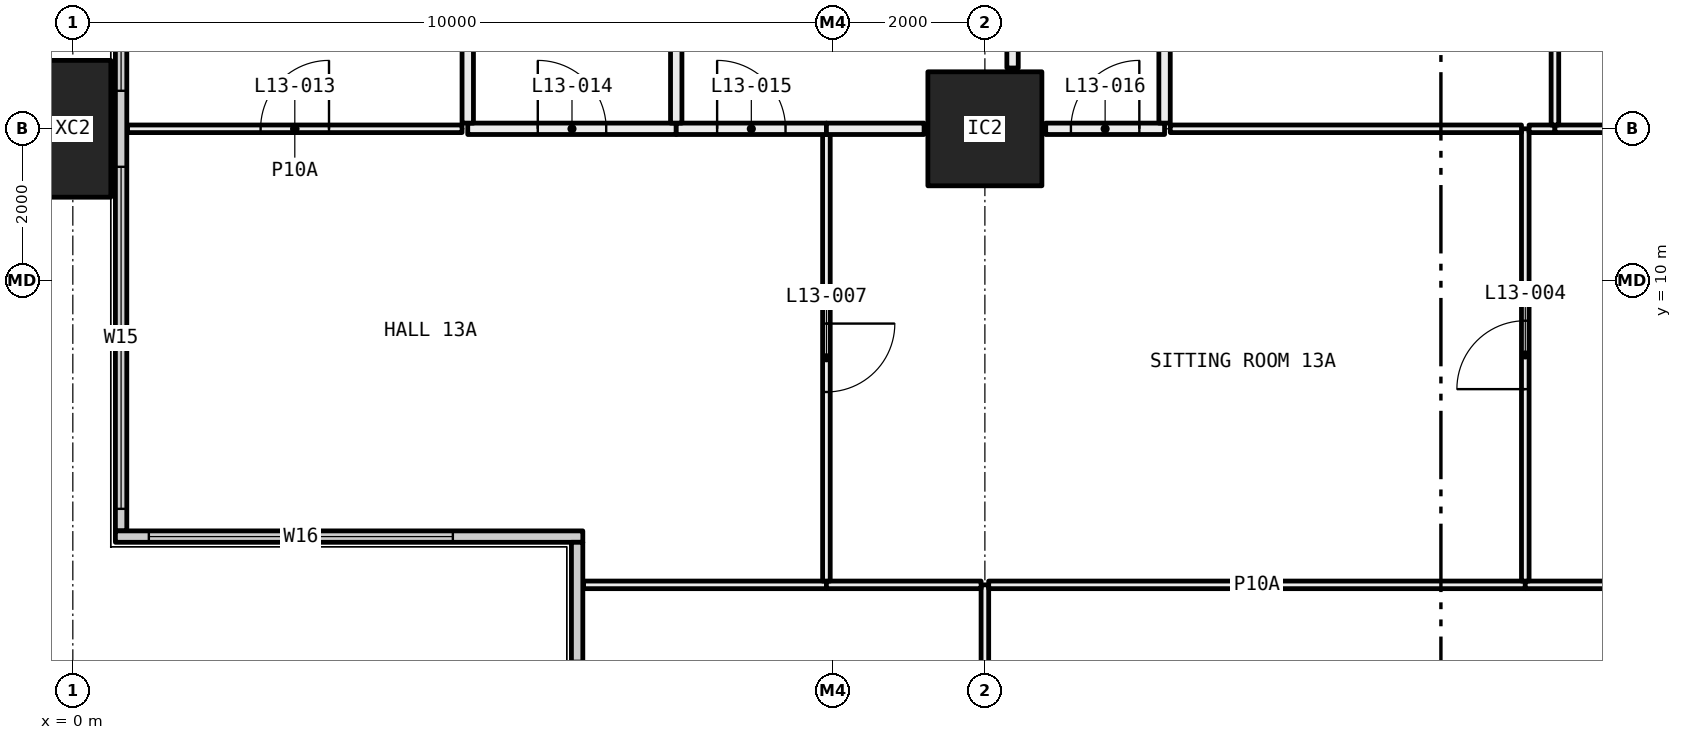
"""IFC4 building model, lengths in metres.
Left out: names, types, materials, properties, quantities, classifications, styles, units other than length and angle.
Written with IfcOpenShell. Run it as: python <this file> out.ifc"""

import sys

from ifc_helpers import new_model, si_unit, direction, frame, frame_2d, origin, origin_2d, place, context, subcontext, project, spatial, rectangle, hollow_rectangle, extrude, element, fill, save


model = new_model("IFC4")
c1 = context("Model", 3, precision=1e-05, world=origin(), true_north=direction((0.0, 1.0)))
c2 = subcontext(c1, "Body", "Model", "MODEL_VIEW")
j1 = project(units=[si_unit("LENGTHUNIT", "METRE"), si_unit("PLANEANGLEUNIT", "RADIAN")], contexts=[c1])
p1 = place(None, origin())
s1 = spatial("IfcSite", under=j1, at=p1, CompositionType="ELEMENT")
p2 = place(p1, origin())
s2 = spatial("IfcBuilding", under=s1, at=p2, CompositionType="ELEMENT")
p3 = place(p2, frame((0.0, 0.0, 57.6)))
s3 = spatial("IfcBuildingStorey", under=s2, at=p3, CompositionType="ELEMENT", Elevation=57.6)
p4 = place(p3, frame((0.0, 12.0, -0.4), z_axis=(0.0, 0.0, 1.0), x_axis=(0.0, 1.0, 0.0)))
e1 = element("IfcColumn", 1, at=p4, inside=s3, PredefinedType="COLUMN", context=c2, shape_type="SweptSolid", body=[
    extrude(hollow_rectangle(XDim=1.8, YDim=1.0, WallThickness=0.07, at=origin_2d()), origin(), (0.0, 0.0, 1.0), 3.45),
])
p5 = place(p3, frame((12.0, 12.0, 0.0), z_axis=(0.0, 0.0, 1.0), x_axis=(1.0, 0.0, 0.0)))
e2 = element("IfcColumn", 2, at=p5, inside=s3, PredefinedType="COLUMN", context=c2, shape_type="SweptSolid", body=[
    extrude(hollow_rectangle(XDim=1.5, YDim=1.5, WallThickness=0.065, at=origin_2d()), origin(), (0.0, 0.0, 1.0), 3.05),
])
p6 = place(p3, frame((0.635, 6.71, 0.0), z_axis=(0.0, 0.0, 1.0), x_axis=(0.0, 1.0, 0.0)))
e3 = element("IfcWall", 3, at=p6, inside=s3, PredefinedType="ELEMENTEDWALL", context=c2, shape_type="SweptSolid", body=[
    extrude(rectangle(XDim=34.58, YDim=0.15, at=frame_2d((17.29, 0.0))), origin(), (0.0, 0.0, 1.0), 3.05),
])
p7 = place(p6, frame((0.29, 0.0, 0.45)))
e4 = element("IfcOpeningElement", 4, at=p7, cuts=e3, PredefinedType="OPENING", context=c2, shape_type="SweptSolid", body=[
    extrude(rectangle(XDim=4.5, YDim=2.55, at=frame_2d((2.25, 1.275))), frame((0.0, 0.085, 0.0), z_axis=(0.0, -1.0, 0.0), x_axis=(1.0, 0.0, 0.0)), (0.0, 0.0, 1.0), 0.17),
])
p8 = place(p6, frame((5.79, 0.0, 0.45)))
e5 = element("IfcOpeningElement", 5, at=p8, cuts=e3, PredefinedType="OPENING", context=c2, shape_type="SweptSolid", body=[
    extrude(rectangle(XDim=3.25, YDim=2.55, at=frame_2d((1.625, 1.275))), frame((0.0, 0.085, 0.0), z_axis=(0.0, -1.0, 0.0), x_axis=(1.0, 0.0, 0.0)), (0.0, 0.0, 1.0), 0.17),
])
p9 = place(p6, frame((13.54, 0.0, 0.45)))
e6 = element("IfcOpeningElement", 6, at=p9, cuts=e3, PredefinedType="OPENING", context=c2, shape_type="SweptSolid", body=[
    extrude(rectangle(XDim=3.25, YDim=2.55, at=frame_2d((1.625, 1.275))), frame((0.0, 0.085, 0.0), z_axis=(0.0, -1.0, 0.0), x_axis=(1.0, 0.0, 0.0)), (0.0, 0.0, 1.0), 0.17),
])
p10 = place(p6, frame((17.79, 0.0, 0.45)))
e7 = element("IfcOpeningElement", 7, at=p10, cuts=e3, PredefinedType="OPENING", context=c2, shape_type="SweptSolid", body=[
    extrude(rectangle(XDim=3.25, YDim=2.55, at=frame_2d((1.625, 1.275))), frame((0.0, 0.085, 0.0), z_axis=(0.0, -1.0, 0.0), x_axis=(1.0, 0.0, 0.0)), (0.0, 0.0, 1.0), 0.17),
])
p11 = place(p6, frame((26.79, 0.0, 0.45)))
e8 = element("IfcOpeningElement", 8, at=p11, cuts=e3, PredefinedType="OPENING", context=c2, shape_type="SweptSolid", body=[
    extrude(rectangle(XDim=2.0, YDim=2.55, at=frame_2d((1.0, 1.275))), frame((0.0, 0.085, 0.0), z_axis=(0.0, -1.0, 0.0), x_axis=(1.0, 0.0, 0.0)), (0.0, 0.0, 1.0), 0.17),
])
p12 = place(p6, frame((29.79, 0.0, 0.45)))
e9 = element("IfcOpeningElement", 9, at=p12, cuts=e3, PredefinedType="OPENING", context=c2, shape_type="SweptSolid", body=[
    extrude(rectangle(XDim=4.5, YDim=2.55, at=frame_2d((2.25, 1.275))), frame((0.0, 0.085, 0.0), z_axis=(0.0, -1.0, 0.0), x_axis=(1.0, 0.0, 0.0)), (0.0, 0.0, 1.0), 0.17),
])
p13 = place(p3, frame((0.56, 6.635, 0.0), z_axis=(0.0, 0.0, 1.0), x_axis=(1.0, 0.0, 0.0)))
e10 = element("IfcWall", 10, at=p13, inside=s3, PredefinedType="ELEMENTEDWALL", context=c2, shape_type="SweptSolid", body=[
    extrude(rectangle(XDim=6.15, YDim=0.15, at=frame_2d((3.075, 0.0))), origin(), (0.0, 0.0, 1.0), 3.05),
])
p14 = place(p13, frame((0.44, 0.0, 0.45)))
e11 = element("IfcOpeningElement", 11, at=p14, cuts=e10, PredefinedType="OPENING", context=c2, shape_type="SweptSolid", body=[
    extrude(rectangle(XDim=4.0, YDim=2.55, at=frame_2d((2.0, 1.275))), frame((0.0, 0.085, 0.0), z_axis=(0.0, -1.0, 0.0), x_axis=(1.0, 0.0, 0.0)), (0.0, 0.0, 1.0), 0.17),
])
p15 = place(p3, frame((6.635, 0.71, 0.0), z_axis=(0.0, 0.0, 1.0), x_axis=(0.0, 1.0, 0.0)))
e12 = element("IfcWall", 12, at=p15, inside=s3, PredefinedType="ELEMENTEDWALL", context=c2, shape_type="SweptSolid", body=[
    extrude(rectangle(XDim=5.85, YDim=0.15, at=frame_2d((2.925, 0.0))), origin(), (0.0, 0.0, 1.0), 3.05),
])
p16 = place(p15, frame((0.29, 0.0, 0.45)))
e13 = element("IfcOpeningElement", 13, at=p16, cuts=e12, PredefinedType="OPENING", context=c2, shape_type="SweptSolid", body=[
    extrude(rectangle(XDim=4.0, YDim=2.55, at=frame_2d((2.0, 1.275))), frame((0.0, 0.085, 0.0), z_axis=(0.0, -1.0, 0.0), x_axis=(1.0, 0.0, 0.0)), (0.0, 0.0, 1.0), 0.17),
])
p17 = place(p3, frame((12.0, 0.72, 0.0), z_axis=(0.0, 0.0, 1.0), x_axis=(0.0, 1.0, 0.0)))
e14 = element("IfcWall", 14, at=p17, inside=s3, PredefinedType="PARTITIONING", context=c2, shape_type="SweptSolid", body=[
    extrude(rectangle(XDim=5.28, YDim=0.1, at=frame_2d((2.64, 0.0))), origin(), (0.0, 0.0, 1.0), 2.45),
])
p18 = place(p17, frame((2.19, 0.0, 0.0)))
e15 = element("IfcOpeningElement", 15, at=p18, cuts=e14, PredefinedType="OPENING", context=c2, shape_type="SweptSolid", body=[
    extrude(rectangle(XDim=0.9, YDim=2.1, at=frame_2d((0.45, 1.05))), frame((0.0, 0.06, 0.0), z_axis=(0.0, -1.0, 0.0), x_axis=(1.0, 0.0, 0.0)), (0.0, 0.0, 1.0), 0.12),
])
p19 = place(p3, frame((9.915, 6.0, 0.0), z_axis=(0.0, 0.0, 1.0), x_axis=(-1.0, 0.0, 0.0)))
e16 = element("IfcWall", 16, at=p19, inside=s3, PredefinedType="PARTITIONING", context=c2, shape_type="SweptSolid", body=[
    extrude(rectangle(XDim=3.195, YDim=0.1, at=frame_2d((1.598, 0.0))), origin(), (0.0, 0.0, 1.0), 3.05),
])
p20 = place(p3, frame((11.95, 6.0, 0.0), z_axis=(0.0, 0.0, 1.0), x_axis=(-1.0, 0.0, 0.0)))
e17 = element("IfcWall", 17, at=p20, inside=s3, PredefinedType="PARTITIONING", context=c2, shape_type="SweptSolid", body=[
    extrude(rectangle(XDim=2.035, YDim=0.1, at=frame_2d((1.018, 0.0))), origin(), (0.0, 0.0, 1.0), 2.45),
])
p21 = place(p3, frame((19.11, 6.0, 0.0), z_axis=(0.0, 0.0, 1.0), x_axis=(-1.0, 0.0, 0.0)))
e18 = element("IfcWall", 18, at=p21, inside=s3, PredefinedType="PARTITIONING", context=c2, shape_type="SweptSolid", body=[
    extrude(rectangle(XDim=7.06, YDim=0.1, at=frame_2d((3.53, 0.0))), origin(), (0.0, 0.0, 1.0), 2.45),
])
p22 = place(p3, frame((23.95, 6.0, 0.0), z_axis=(0.0, 0.0, 1.0), x_axis=(-1.0, 0.0, 0.0)))
e19 = element("IfcWall", 19, at=p22, inside=s3, PredefinedType="PARTITIONING", context=c2, shape_type="SweptSolid", body=[
    extrude(rectangle(XDim=4.84, YDim=0.1, at=frame_2d((2.42, 0.0))), origin(), (0.0, 0.0, 1.0), 2.45),
])
p23 = place(p22, frame((1.97, 0.0, 0.0)))
e20 = element("IfcOpeningElement", 20, at=p23, cuts=e19, PredefinedType="OPENING", context=c2, shape_type="SweptSolid", body=[
    extrude(rectangle(XDim=0.9, YDim=2.1, at=frame_2d((0.45, 1.05))), frame((0.0, 0.06, 0.0), z_axis=(0.0, -1.0, 0.0), x_axis=(1.0, 0.0, 0.0)), (0.0, 0.0, 1.0), 0.12),
])
p24 = place(p3, frame((9.915, 6.05, 0.0), z_axis=(0.0, 0.0, 1.0), x_axis=(0.0, 1.0, 0.0)))
e21 = element("IfcWall", 21, at=p24, inside=s3, PredefinedType="PARTITIONING", context=c2, shape_type="SweptSolid", body=[
    extrude(rectangle(XDim=5.875, YDim=0.1, at=frame_2d((2.938, 0.0))), origin(), (0.0, 0.0, 1.0), 2.45),
])
p25 = place(p24, frame((2.488, 0.0, 0.0)))
e22 = element("IfcOpeningElement", 22, at=p25, cuts=e21, PredefinedType="OPENING", context=c2, shape_type="SweptSolid", body=[
    extrude(rectangle(XDim=0.9, YDim=2.1, at=frame_2d((0.45, 1.05))), frame((0.0, 0.06, 0.0), z_axis=(0.0, -1.0, 0.0), x_axis=(1.0, 0.0, 0.0)), (0.0, 0.0, 1.0), 0.12),
])
p26 = place(p3, frame((5.121, 12.0, 0.0), z_axis=(0.0, 0.0, 1.0), x_axis=(-1.0, 0.0, 0.0)))
e23 = element("IfcWall", 23, at=p26, inside=s3, PredefinedType="PARTITIONING", context=c2, shape_type="SweptSolid", body=[
    extrude(rectangle(XDim=4.401, YDim=0.1, at=frame_2d((2.201, 0.0))), origin(), (0.0, 0.0, 1.0), 2.45),
])
p27 = place(p26, frame((1.75, 0.0, 0.0)))
e24 = element("IfcOpeningElement", 24, at=p27, cuts=e23, PredefinedType="OPENING", context=c2, shape_type="SweptSolid", body=[
    extrude(rectangle(XDim=0.9, YDim=2.1, at=frame_2d((0.45, 1.05))), frame((0.0, 0.06, 0.0), z_axis=(0.0, -1.0, 0.0), x_axis=(1.0, 0.0, 0.0)), (0.0, 0.0, 1.0), 0.12),
])
p28 = place(p3, frame((7.939, 12.0, 0.0), z_axis=(0.0, 0.0, 1.0), x_axis=(-1.0, 0.0, 0.0)))
e25 = element("IfcWall", 25, at=p28, inside=s3, PredefinedType="PARTITIONING", context=c2, shape_type="SweptSolid", body=[
    extrude(rectangle(XDim=2.743, YDim=0.15, at=frame_2d((1.372, 0.0))), origin(), (0.0, 0.0, 1.0), 2.45),
])
p29 = place(p28, frame((0.921, 0.0, 0.0)))
e26 = element("IfcOpeningElement", 26, at=p29, cuts=e25, PredefinedType="OPENING", context=c2, shape_type="SweptSolid", body=[
    extrude(rectangle(XDim=0.9, YDim=2.1, at=frame_2d((0.45, 1.05))), frame((0.0, 0.085, 0.0), z_axis=(0.0, -1.0, 0.0), x_axis=(1.0, 0.0, 0.0)), (0.0, 0.0, 1.0), 0.17),
])
p30 = place(p3, frame((9.915, 12.0, 0.0), z_axis=(0.0, 0.0, 1.0), x_axis=(-1.0, 0.0, 0.0)))
e27 = element("IfcWall", 27, at=p30, inside=s3, PredefinedType="PARTITIONING", context=c2, shape_type="SweptSolid", body=[
    extrude(rectangle(XDim=1.976, YDim=0.15, at=frame_2d((0.988, 0.0))), origin(), (0.0, 0.0, 1.0), 2.45),
])
p31 = place(p30, frame((0.538, 0.0, 0.0)))
e28 = element("IfcOpeningElement", 28, at=p31, cuts=e27, PredefinedType="OPENING", context=c2, shape_type="SweptSolid", body=[
    extrude(rectangle(XDim=0.9, YDim=2.1, at=frame_2d((0.45, 1.05))), frame((0.0, 0.085, 0.0), z_axis=(0.0, -1.0, 0.0), x_axis=(1.0, 0.0, 0.0)), (0.0, 0.0, 1.0), 0.17),
])
p32 = place(p3, frame((19.11, 6.05, 0.0), z_axis=(0.0, 0.0, 1.0), x_axis=(0.0, 1.0, 0.0)))
e29 = element("IfcWall", 29, at=p32, inside=s3, PredefinedType="PARTITIONING", context=c2, shape_type="SweptSolid", body=[
    extrude(rectangle(XDim=5.95, YDim=0.1, at=frame_2d((2.975, 0.0))), origin(), (0.0, 0.0, 1.0), 2.45),
])
p33 = place(p32, frame((2.525, 0.0, 0.0)))
e30 = element("IfcOpeningElement", 30, at=p33, cuts=e29, PredefinedType="OPENING", context=c2, shape_type="SweptSolid", body=[
    extrude(rectangle(XDim=0.9, YDim=2.1, at=frame_2d((0.45, 1.05))), frame((0.0, 0.06, 0.0), z_axis=(0.0, -1.0, 0.0), x_axis=(1.0, 0.0, 0.0)), (0.0, 0.0, 1.0), 0.12),
])
p34 = place(p3, frame((11.2, 12.0, 0.0), z_axis=(0.0, 0.0, 1.0), x_axis=(-1.0, 0.0, 0.0)))
e31 = element("IfcWall", 31, at=p34, inside=s3, PredefinedType="PARTITIONING", context=c2, shape_type="SweptSolid", body=[
    extrude(rectangle(XDim=1.285, YDim=0.15, at=frame_2d((0.643, 0.0))), origin(), (0.0, 0.0, 1.0), 2.45),
])
p35 = place(p3, frame((14.364, 12.0, 0.0), z_axis=(0.0, 0.0, 1.0), x_axis=(-1.0, 0.0, 0.0)))
e32 = element("IfcWall", 32, at=p35, inside=s3, PredefinedType="PARTITIONING", context=c2, shape_type="SweptSolid", body=[
    extrude(rectangle(XDim=1.564, YDim=0.15, at=frame_2d((0.782, 0.0))), origin(), (0.0, 0.0, 1.0), 2.45),
])
p36 = place(p35, frame((0.332, 0.0, 0.0)))
e33 = element("IfcOpeningElement", 33, at=p36, cuts=e32, PredefinedType="OPENING", context=c2, shape_type="SweptSolid", body=[
    extrude(rectangle(XDim=0.9, YDim=2.1, at=frame_2d((0.45, 1.05))), frame((0.0, 0.085, 0.0), z_axis=(0.0, -1.0, 0.0), x_axis=(1.0, 0.0, 0.0)), (0.0, 0.0, 1.0), 0.17),
])
p37 = place(p3, frame((19.06, 12.0, 0.0), z_axis=(0.0, 0.0, 1.0), x_axis=(-1.0, 0.0, 0.0)))
e34 = element("IfcWall", 34, at=p37, inside=s3, PredefinedType="PARTITIONING", context=c2, shape_type="SweptSolid", body=[
    extrude(rectangle(XDim=4.621, YDim=0.1, at=frame_2d((2.311, 0.0))), origin(), (0.0, 0.0, 1.0), 2.45),
])
p38 = place(p3, frame((19.5, 12.0, 0.0), z_axis=(0.0, 0.0, 1.0), x_axis=(-1.0, 0.0, 0.0)))
e35 = element("IfcWall", 35, at=p38, inside=s3, PredefinedType="PARTITIONING", context=c2, shape_type="SweptSolid", body=[
    extrude(rectangle(XDim=0.34, YDim=0.1, at=frame_2d((0.17, 0.0))), origin(), (0.0, 0.0, 1.0), 2.45),
])
p39 = place(p3, frame((23.2, 12.0, 0.0), z_axis=(0.0, 0.0, 1.0), x_axis=(-1.0, 0.0, 0.0)))
e36 = element("IfcWall", 36, at=p39, inside=s3, PredefinedType="PARTITIONING", context=c2, shape_type="SweptSolid", body=[
    extrude(rectangle(XDim=3.7, YDim=0.1, at=frame_2d((1.85, 0.0))), origin(), (0.0, 0.0, 1.0), 2.45),
])
p40 = place(p39, frame((1.4, 0.0, 0.0)))
e37 = element("IfcOpeningElement", 37, at=p40, cuts=e36, PredefinedType="OPENING", context=c2, shape_type="SweptSolid", body=[
    extrude(rectangle(XDim=0.9, YDim=2.1, at=frame_2d((0.45, 1.05))), frame((0.0, 0.06, 0.0), z_axis=(0.0, -1.0, 0.0), x_axis=(1.0, 0.0, 0.0)), (0.0, 0.0, 1.0), 0.12),
])
p41 = place(p3, frame((5.196, 12.075, 0.0), z_axis=(0.0, 0.0, 1.0), x_axis=(0.0, 1.0, 0.0)))
e38 = element("IfcWall", 38, at=p41, inside=s3, PredefinedType="PARTITIONING", context=c2, shape_type="SweptSolid", body=[
    extrude(rectangle(XDim=5.825, YDim=0.15, at=frame_2d((2.913, 0.0))), origin(), (0.0, 0.0, 1.0), 2.45),
])
p42 = place(p3, frame((7.939, 12.075, 0.0), z_axis=(0.0, 0.0, 1.0), x_axis=(0.0, 1.0, 0.0)))
e39 = element("IfcWall", 39, at=p42, inside=s3, PredefinedType="PARTITIONING", context=c2, shape_type="SweptSolid", body=[
    extrude(rectangle(XDim=2.637, YDim=0.15, at=frame_2d((1.318, 0.0))), origin(), (0.0, 0.0, 1.0), 2.45),
])
p43 = place(p3, frame((12.364, 12.8, 0.0), z_axis=(0.0, 0.0, 1.0), x_axis=(0.0, 1.0, 0.0)))
e40 = element("IfcWall", 40, at=p43, inside=s3, PredefinedType="PARTITIONING", context=c2, shape_type="SweptSolid", body=[
    extrude(rectangle(XDim=1.837, YDim=0.15, at=frame_2d((0.918, 0.0))), origin(), (0.0, 0.0, 1.0), 3.05),
])
p44 = place(p3, frame((14.364, 12.075, 0.0), z_axis=(0.0, 0.0, 1.0), x_axis=(0.0, 1.0, 0.0)))
e41 = element("IfcWall", 41, at=p44, inside=s3, PredefinedType="PARTITIONING", context=c2, shape_type="SweptSolid", body=[
    extrude(rectangle(XDim=5.825, YDim=0.15, at=frame_2d((2.913, 0.0))), origin(), (0.0, 0.0, 1.0), 2.45),
])
p45 = place(p3, frame((19.5, 12.05, 0.0), z_axis=(0.0, 0.0, 1.0), x_axis=(0.0, 1.0, 0.0)))
e42 = element("IfcWall", 42, at=p45, inside=s3, PredefinedType="PARTITIONING", context=c2, shape_type="SweptSolid", body=[
    extrude(rectangle(XDim=5.85, YDim=0.1, at=frame_2d((2.925, 0.0))), origin(), (0.0, 0.0, 1.0), 2.45),
])
p46 = place(p45, frame((2.475, 0.0, 0.0)))
e43 = element("IfcOpeningElement", 43, at=p46, cuts=e42, PredefinedType="OPENING", context=c2, shape_type="SweptSolid", body=[
    extrude(rectangle(XDim=0.9, YDim=2.1, at=frame_2d((0.45, 1.05))), frame((0.0, 0.06, 0.0), z_axis=(0.0, -1.0, 0.0), x_axis=(1.0, 0.0, 0.0)), (0.0, 0.0, 1.0), 0.12),
])
p47 = place(p7, origin())
e44 = element("IfcWindow", 44, at=p47, inside=s3, PartitioningType="SINGLE_PANEL", PredefinedType="WINDOW", context=c2, shape_type="SweptSolid", body=[
    extrude(rectangle(XDim=4.5, YDim=2.55, at=frame_2d((2.25, 1.275))), frame((0.0, 0.03, 0.0), z_axis=(0.0, -1.0, 0.0), x_axis=(1.0, 0.0, 0.0)), (0.0, 0.0, 1.0), 0.06),
])
fill(e4, e44)
p48 = place(p8, origin())
e45 = element("IfcWindow", 45, at=p48, inside=s3, PartitioningType="SINGLE_PANEL", PredefinedType="WINDOW", context=c2, shape_type="SweptSolid", body=[
    extrude(rectangle(XDim=3.25, YDim=2.55, at=frame_2d((1.625, 1.275))), frame((0.0, 0.03, 0.0), z_axis=(0.0, -1.0, 0.0), x_axis=(1.0, 0.0, 0.0)), (0.0, 0.0, 1.0), 0.06),
])
fill(e5, e45)
p49 = place(p14, origin())
e46 = element("IfcWindow", 46, at=p49, inside=s3, PartitioningType="SINGLE_PANEL", PredefinedType="WINDOW", context=c2, shape_type="SweptSolid", body=[
    extrude(rectangle(XDim=4.0, YDim=2.55, at=frame_2d((2.0, 1.275))), frame((0.0, 0.03, 0.0), z_axis=(0.0, -1.0, 0.0), x_axis=(1.0, 0.0, 0.0)), (0.0, 0.0, 1.0), 0.06),
])
fill(e11, e46)
p50 = place(p33, origin())
e47 = element("IfcDoor", 47, at=p50, inside=s3, OperationType="SINGLE_SWING_RIGHT", PredefinedType="DOOR", context=c2, shape_type="SweptSolid", body=[
    extrude(rectangle(XDim=0.9, YDim=2.1, at=frame_2d((0.45, 1.05))), frame((0.0, 0.025, 0.0), z_axis=(0.0, -1.0, 0.0), x_axis=(1.0, 0.0, 0.0)), (0.0, 0.0, 1.0), 0.05),
])
fill(e30, e47)
p51 = place(p25, frame((0.9, 0.0, 0.0), x_axis=(-1.0, 0.0, 0.0)))
e48 = element("IfcDoor", 48, at=p51, inside=s3, OperationType="SINGLE_SWING_RIGHT", PredefinedType="DOOR", context=c2, shape_type="SweptSolid", body=[
    extrude(rectangle(XDim=0.9, YDim=2.1, at=frame_2d((0.45, 1.05))), frame((0.0, 0.025, 0.0), z_axis=(0.0, -1.0, 0.0), x_axis=(1.0, 0.0, 0.0)), (0.0, 0.0, 1.0), 0.05),
])
fill(e22, e48)
p52 = place(p27, frame((0.9, 0.0, 0.0), x_axis=(-1.0, 0.0, 0.0)))
e49 = element("IfcDoor", 49, at=p52, inside=s3, OperationType="SINGLE_SWING_LEFT", PredefinedType="DOOR", context=c2, shape_type="SweptSolid", body=[
    extrude(rectangle(XDim=0.9, YDim=2.1, at=frame_2d((0.45, 1.05))), frame((0.0, 0.025, 0.0), z_axis=(0.0, -1.0, 0.0), x_axis=(1.0, 0.0, 0.0)), (0.0, 0.0, 1.0), 0.05),
])
fill(e24, e49)
p53 = place(p29, frame((0.9, 0.0, 0.0), x_axis=(-1.0, 0.0, 0.0)))
e50 = element("IfcDoor", 50, at=p53, inside=s3, OperationType="SINGLE_SWING_RIGHT", PredefinedType="DOOR", context=c2, shape_type="SweptSolid", body=[
    extrude(rectangle(XDim=0.9, YDim=2.1, at=frame_2d((0.45, 1.05))), frame((0.0, 0.025, 0.0), z_axis=(0.0, -1.0, 0.0), x_axis=(1.0, 0.0, 0.0)), (0.0, 0.0, 1.0), 0.05),
])
fill(e26, e50)
p54 = place(p31, frame((0.9, 0.0, 0.0), x_axis=(-1.0, 0.0, 0.0)))
e51 = element("IfcDoor", 51, at=p54, inside=s3, OperationType="SINGLE_SWING_RIGHT", PredefinedType="DOOR", context=c2, shape_type="SweptSolid", body=[
    extrude(rectangle(XDim=0.9, YDim=2.1, at=frame_2d((0.45, 1.05))), frame((0.0, 0.025, 0.0), z_axis=(0.0, -1.0, 0.0), x_axis=(1.0, 0.0, 0.0)), (0.0, 0.0, 1.0), 0.05),
])
fill(e28, e51)
p55 = place(p36, frame((0.9, 0.0, 0.0), x_axis=(-1.0, 0.0, 0.0)))
e52 = element("IfcDoor", 52, at=p55, inside=s3, OperationType="SINGLE_SWING_LEFT", PredefinedType="DOOR", context=c2, shape_type="SweptSolid", body=[
    extrude(rectangle(XDim=0.9, YDim=2.1, at=frame_2d((0.45, 1.05))), frame((0.0, 0.025, 0.0), z_axis=(0.0, -1.0, 0.0), x_axis=(1.0, 0.0, 0.0)), (0.0, 0.0, 1.0), 0.05),
])
fill(e33, e52)
save(model, sys.argv[1])
